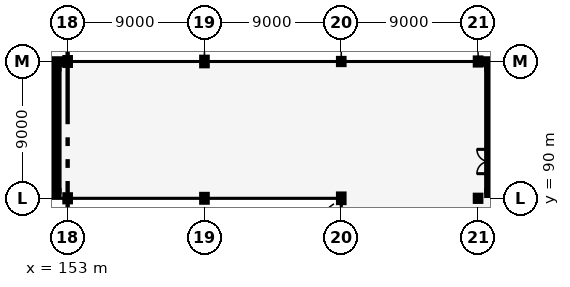
"""IFC4 building model, lengths in metres.
Left out: names, types, materials, properties, quantities, classifications, styles, units other than length and angle.
Written with IfcOpenShell. Run it as: python <this file> out.ifc"""

import sys

from ifc_helpers import new_model, si_unit, direction, frame, frame_2d, origin, origin_2d, place, context, subcontext, project, spatial, rectangle, i_section, extrude, element, fill, save


model = new_model("IFC4")
c1 = context("Model", 3, precision=1e-05, world=origin(), true_north=direction((0.0, 1.0)))
c2 = subcontext(c1, "Body", "Model", "MODEL_VIEW")
j1 = project(units=[si_unit("LENGTHUNIT", "METRE"), si_unit("PLANEANGLEUNIT", "RADIAN")], contexts=[c1])
p1 = place(None, origin())
s1 = spatial("IfcSite", under=j1, at=p1, CompositionType="ELEMENT")
p2 = place(p1, origin())
s2 = spatial("IfcBuilding", under=s1, at=p2, CompositionType="ELEMENT")
p3 = place(p2, frame((0.0, 0.0, 22.8)))
s3 = spatial("IfcBuildingStorey", under=s2, at=p3, CompositionType="ELEMENT", Elevation=22.8)
p4 = place(p3, frame((153.0, 90.0, 0.0), z_axis=(0.0, 0.0, 1.0), x_axis=(1.0, 0.0, 0.0)))
e1 = element("IfcColumn", 1, at=p4, inside=s3, PredefinedType="COLUMN", context=c2, shape_type="SweptSolid", body=[
    extrude(i_section(OverallWidth=0.3, OverallDepth=0.4, WebThickness=0.013, FlangeThickness=0.024, FilletRadius=0.027, at=origin_2d()), origin(), (0.0, 0.0, 1.0), 4.0),
])
for number, where, z_axis, x_axis in (
    (2, (153.0, 99.0, 0.0), (0.0, 0.0, 1.0), (1.0, 0.0, 0.0)),
    (3, (162.0, 90.0, 0.0), (0.0, 0.0, 1.0), (1.0, 0.0, 0.0)),
):
    element("IfcColumn", number, at=place(p3, frame(where, z_axis=z_axis, x_axis=x_axis)), inside=s3, PredefinedType="COLUMN", context=c2, shape_type="SweptSolid", body=[
        extrude(i_section(OverallWidth=0.3, OverallDepth=0.45, WebThickness=0.014, FlangeThickness=0.026, FilletRadius=0.027, at=origin_2d()), origin(), (0.0, 0.0, 1.0), 4.0),
    ])
for number, where, z_axis, x_axis in (
    (4, (162.0, 99.0, 0.0), (0.0, 0.0, 1.0), (1.0, 0.0, 0.0)),
    (5, (171.0, 90.0, 0.0), (0.0, 0.0, 1.0), (1.0, 0.0, 0.0)),
):
    element("IfcColumn", number, at=place(p3, frame(where, z_axis=z_axis, x_axis=x_axis)), inside=s3, PredefinedType="COLUMN", context=c2, shape_type="SweptSolid", body=[
        extrude(i_section(OverallWidth=0.3, OverallDepth=0.5, WebThickness=0.014, FlangeThickness=0.028, FilletRadius=0.027, at=origin_2d()), origin(), (0.0, 0.0, 1.0), 4.0),
    ])
for number, where, z_axis, x_axis in (
    (6, (171.0, 99.0, 0.0), (0.0, 0.0, 1.0), (1.0, 0.0, 0.0)),
    (7, (180.0, 90.0, 0.0), (0.0, 0.0, 1.0), (1.0, 0.0, 0.0)),
):
    element("IfcColumn", number, at=place(p3, frame(where, z_axis=z_axis, x_axis=x_axis)), inside=s3, PredefinedType="COLUMN", context=c2, shape_type="SweptSolid", body=[
        extrude(i_section(OverallWidth=0.3, OverallDepth=0.34, WebThickness=0.012, FlangeThickness=0.021, FilletRadius=0.027, at=origin_2d()), origin(), (0.0, 0.0, 1.0), 4.0),
    ])
p5 = place(p3, frame((180.0, 99.0, 0.0), z_axis=(0.0, 0.0, 1.0), x_axis=(1.0, 0.0, 0.0)))
e8 = element("IfcColumn", 8, at=p5, inside=s3, PredefinedType="COLUMN", context=c2, shape_type="SweptSolid", body=[
    extrude(i_section(OverallWidth=0.3, OverallDepth=0.4, WebThickness=0.013, FlangeThickness=0.024, FilletRadius=0.027, at=origin_2d()), origin(), (0.0, 0.0, 1.0), 4.0),
])
p6 = place(p3, frame((144.145, 99.0, 0.0), z_axis=(0.0, 0.0, 1.0), x_axis=(1.0, 0.0, 0.0)))
e9 = element("IfcWall", 9, at=p6, inside=s3, PredefinedType="SOLIDWALL", context=c2, shape_type="SweptSolid", body=[
    extrude(rectangle(XDim=8.71, YDim=0.29, at=frame_2d((4.355, 0.0))), origin(), (0.0, 0.0, 1.0), 2.85),
])
p7 = place(p3, frame((180.145, 99.0, 0.0), z_axis=(0.0, 0.0, 1.0), x_axis=(1.0, 0.0, 0.0)))
e10 = element("IfcWall", 10, at=p7, inside=s3, PredefinedType="SOLIDWALL", context=c2, shape_type="SweptSolid", body=[
    extrude(rectangle(XDim=11.71, YDim=0.29, at=frame_2d((5.855, 0.0))), origin(), (0.0, 0.0, 1.0), 2.85),
])
p8 = place(p3, frame((180.725, 90.47, 0.0), z_axis=(0.0, 0.0, 1.0), x_axis=(0.0, 1.0, 0.0)))
e11 = element("IfcWall", 11, at=p8, inside=s3, PredefinedType="SHEAR", context=c2, shape_type="SweptSolid", body=[
    extrude(rectangle(XDim=8.06, YDim=0.25, at=frame_2d((4.03, 0.0))), origin(), (0.0, 0.0, 1.0), 3.64),
])
p9 = place(p8, frame((1.15, 0.0, 0.0)))
e12 = element("IfcOpeningElement", 12, at=p9, cuts=e11, PredefinedType="OPENING", context=c2, shape_type="SweptSolid", body=[
    extrude(rectangle(XDim=1.6, YDim=2.2, at=frame_2d((0.8, 1.1))), frame((0.0, 0.135, 0.0), z_axis=(0.0, -1.0, 0.0), x_axis=(1.0, 0.0, 0.0)), (0.0, 0.0, 1.0), 0.27),
])
for number, where, z_axis, x_axis in (
    (13, (180.6, 90.345, 0.0), (0.0, 0.0, 1.0), (1.0, 0.0, 0.0)),
    (14, (180.6, 98.655, 0.0), (0.0, 0.0, 1.0), (1.0, 0.0, 0.0)),
):
    element("IfcWall", number, at=place(p3, frame(where, z_axis=z_axis, x_axis=x_axis)), inside=s3, PredefinedType="SHEAR", context=c2, shape_type="SweptSolid", body=[
        extrude(rectangle(XDim=7.8, YDim=0.25, at=frame_2d((3.9, 0.0))), origin(), (0.0, 0.0, 1.0), 3.64),
    ])
p10 = place(p3, frame((152.275, 90.47, 0.0), z_axis=(0.0, 0.0, 1.0), x_axis=(0.0, 1.0, 0.0)))
e15 = element("IfcWall", 15, at=p10, inside=s3, PredefinedType="SHEAR", context=c2, shape_type="SweptSolid", body=[
    extrude(rectangle(XDim=8.06, YDim=0.25, at=frame_2d((4.03, 0.0))), origin(), (0.0, 0.0, 1.0), 3.64),
])
p11 = place(p10, frame((1.15, 0.0, 0.0)))
e16 = element("IfcOpeningElement", 16, at=p11, cuts=e15, PredefinedType="OPENING", context=c2, shape_type="SweptSolid", body=[
    extrude(rectangle(XDim=1.8, YDim=2.2, at=frame_2d((0.9, 1.1))), frame((0.0, 0.135, 0.0), z_axis=(0.0, -1.0, 0.0), x_axis=(1.0, 0.0, 0.0)), (0.0, 0.0, 1.0), 0.27),
])
for number, where, z_axis, x_axis in (
    (17, (144.6, 90.345, 0.0), (0.0, 0.0, 1.0), (1.0, 0.0, 0.0)),
    (18, (144.6, 98.655, 0.0), (0.0, 0.0, 1.0), (1.0, 0.0, 0.0)),
):
    element("IfcWall", number, at=place(p3, frame(where, z_axis=z_axis, x_axis=x_axis)), inside=s3, PredefinedType="SHEAR", context=c2, shape_type="SweptSolid", body=[
        extrude(rectangle(XDim=7.8, YDim=0.25, at=frame_2d((3.9, 0.0))), origin(), (0.0, 0.0, 1.0), 3.64),
    ])
p12 = place(p3, frame((148.54, 95.37, 0.0), z_axis=(0.0, 0.0, 1.0), x_axis=(1.0, 0.0, 0.0)))
e19 = element("IfcWall", 19, at=p12, inside=s3, PredefinedType="SHEAR", context=c2, shape_type="SweptSolid", body=[
    extrude(rectangle(XDim=3.61, YDim=0.25, at=frame_2d((1.805, 0.0))), origin(), (0.0, 0.0, 1.0), 3.64),
])
p13 = place(p12, frame((0.95, 0.0, 0.0)))
e20 = element("IfcOpeningElement", 20, at=p13, cuts=e19, PredefinedType="OPENING", context=c2, shape_type="SweptSolid", body=[
    extrude(rectangle(XDim=1.2, YDim=2.2, at=frame_2d((0.6, 1.1))), frame((0.0, 0.135, 0.0), z_axis=(0.0, -1.0, 0.0), x_axis=(1.0, 0.0, 0.0)), (0.0, 0.0, 1.0), 0.27),
])
p14 = place(p9, origin())
e21 = element("IfcDoor", 21, at=p14, inside=s3, OperationType="DOUBLE_DOOR_SINGLE_SWING", PredefinedType="DOOR", context=c2, shape_type="SweptSolid", body=[
    extrude(rectangle(XDim=1.6, YDim=2.2, at=frame_2d((0.8, 1.1))), frame((0.0, 0.025, 0.0), z_axis=(0.0, -1.0, 0.0), x_axis=(1.0, 0.0, 0.0)), (0.0, 0.0, 1.0), 0.05),
])
fill(e12, e21)
p15 = place(p11, origin())
e22 = element("IfcDoor", 22, at=p15, inside=s3, OperationType="DOUBLE_DOOR_SINGLE_SWING", PredefinedType="DOOR", context=c2, shape_type="SweptSolid", body=[
    extrude(rectangle(XDim=1.8, YDim=2.2, at=frame_2d((0.9, 1.1))), frame((0.0, 0.025, 0.0), z_axis=(0.0, -1.0, 0.0), x_axis=(1.0, 0.0, 0.0)), (0.0, 0.0, 1.0), 0.05),
])
fill(e16, e22)
save(model, sys.argv[1])
